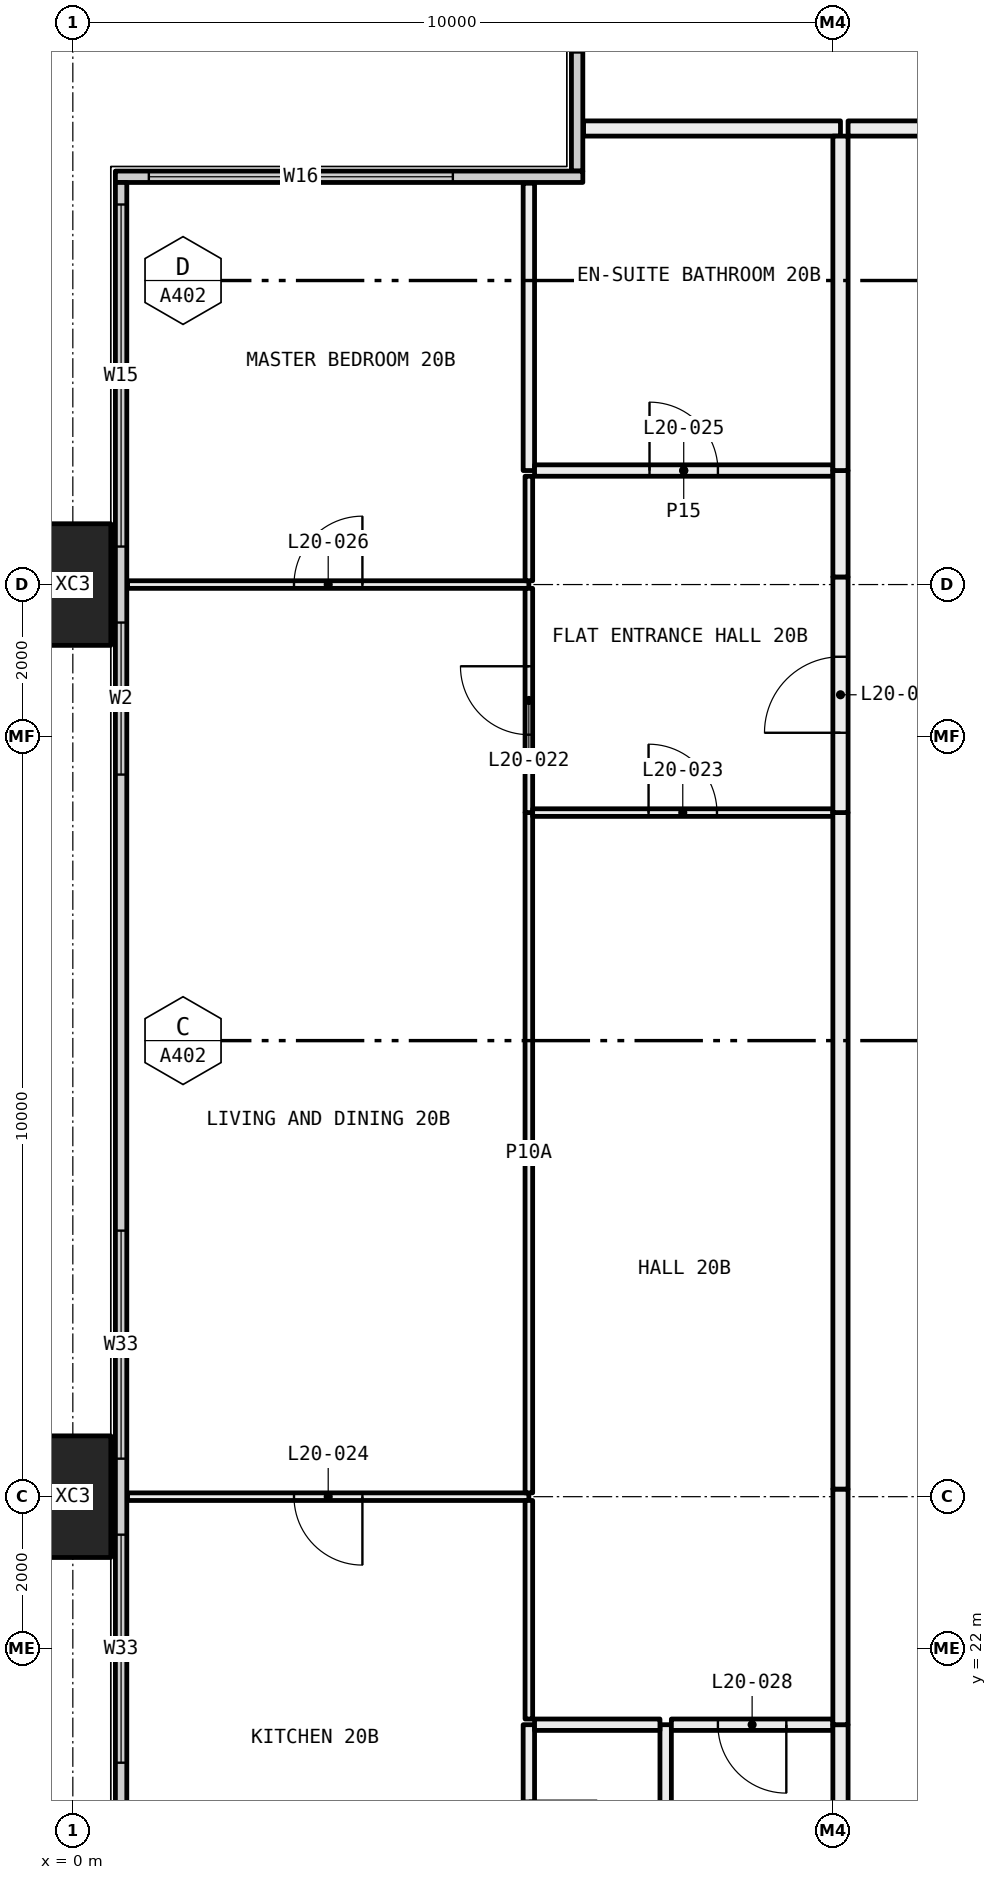
"""IFC4 building model, lengths in metres.
Left out: names, types, materials, properties, quantities, classifications, styles, units other than length and angle.
Written with IfcOpenShell. Run it as: python <this file> out.ifc"""

import sys

from ifc_helpers import new_model, si_unit, direction, frame, frame_2d, origin, origin_2d, place, context, subcontext, project, spatial, rectangle, hollow_rectangle, extrude, element, fill, save


model = new_model("IFC4")
c1 = context("Model", 3, precision=1e-05, world=origin(), true_north=direction((0.0, 1.0)))
c2 = subcontext(c1, "Body", "Model", "MODEL_VIEW")
j1 = project(units=[si_unit("LENGTHUNIT", "METRE"), si_unit("PLANEANGLEUNIT", "RADIAN")], contexts=[c1])
p1 = place(None, origin())
s1 = spatial("IfcSite", under=j1, at=p1, CompositionType="ELEMENT")
p2 = place(p1, origin())
s2 = spatial("IfcBuilding", under=s1, at=p2, CompositionType="ELEMENT")
p3 = place(p2, frame((0.0, 0.0, 81.75)))
s3 = spatial("IfcBuildingStorey", under=s2, at=p3, CompositionType="ELEMENT", Elevation=81.75)
for number, where, z_axis, x_axis in (
    (1, (0.0, 24.0, -0.4), (0.0, 0.0, 1.0), (0.0, 1.0, 0.0)),
    (2, (0.0, 36.0, -0.4), (0.0, 0.0, 1.0), (0.0, 1.0, 0.0)),
):
    element("IfcColumn", number, at=place(p3, frame(where, z_axis=z_axis, x_axis=x_axis)), inside=s3, PredefinedType="COLUMN", context=c2, shape_type="SweptSolid", body=[
        extrude(hollow_rectangle(XDim=1.6, YDim=1.0, WallThickness=0.065, at=origin_2d()), origin(), (0.0, 0.0, 1.0), 3.45),
    ])
p4 = place(p3, frame((6.635, 41.44, 0.0), z_axis=(0.0, 0.0, 1.0), x_axis=(0.0, 1.0, 0.0)))
e3 = element("IfcWall", 3, at=p4, inside=s3, PredefinedType="ELEMENTEDWALL", context=c2, shape_type="SweptSolid", body=[
    extrude(rectangle(XDim=5.85, YDim=0.15, at=frame_2d((2.925, 0.0))), origin(), (0.0, 0.0, 1.0), 3.05),
])
p5 = place(p4, frame((1.56, 0.0, 0.45)))
e4 = element("IfcOpeningElement", 4, at=p5, cuts=e3, PredefinedType="OPENING", context=c2, shape_type="SweptSolid", body=[
    extrude(rectangle(XDim=4.0, YDim=2.55, at=frame_2d((2.0, 1.275))), frame((0.0, 0.085, 0.0), z_axis=(0.0, -1.0, 0.0), x_axis=(1.0, 0.0, 0.0)), (0.0, 0.0, 1.0), 0.17),
])
p6 = place(p3, frame((0.56, 41.365, 0.0), z_axis=(0.0, 0.0, 1.0), x_axis=(1.0, 0.0, 0.0)))
e5 = element("IfcWall", 5, at=p6, inside=s3, PredefinedType="ELEMENTEDWALL", context=c2, shape_type="SweptSolid", body=[
    extrude(rectangle(XDim=6.15, YDim=0.15, at=frame_2d((3.075, 0.0))), origin(), (0.0, 0.0, 1.0), 3.05),
])
p7 = place(p6, frame((0.44, 0.0, 0.45)))
e6 = element("IfcOpeningElement", 6, at=p7, cuts=e5, PredefinedType="OPENING", context=c2, shape_type="SweptSolid", body=[
    extrude(rectangle(XDim=4.0, YDim=2.55, at=frame_2d((2.0, 1.275))), frame((0.0, 0.085, 0.0), z_axis=(0.0, -1.0, 0.0), x_axis=(1.0, 0.0, 0.0)), (0.0, 0.0, 1.0), 0.17),
])
p8 = place(p3, frame((0.635, 6.71, 0.0), z_axis=(0.0, 0.0, 1.0), x_axis=(0.0, 1.0, 0.0)))
e7 = element("IfcWall", 7, at=p8, inside=s3, PredefinedType="ELEMENTEDWALL", context=c2, shape_type="SweptSolid", body=[
    extrude(rectangle(XDim=34.58, YDim=0.15, at=frame_2d((17.29, 0.0))), origin(), (0.0, 0.0, 1.0), 3.05),
])
p9 = place(p8, frame((0.29, 0.0, 0.45)))
e8 = element("IfcOpeningElement", 8, at=p9, cuts=e7, PredefinedType="OPENING", context=c2, shape_type="SweptSolid", body=[
    extrude(rectangle(XDim=4.5, YDim=2.55, at=frame_2d((2.25, 1.275))), frame((0.0, 0.085, 0.0), z_axis=(0.0, -1.0, 0.0), x_axis=(1.0, 0.0, 0.0)), (0.0, 0.0, 1.0), 0.17),
])
p10 = place(p8, frame((5.79, 0.0, 0.45)))
e9 = element("IfcOpeningElement", 9, at=p10, cuts=e7, PredefinedType="OPENING", context=c2, shape_type="SweptSolid", body=[
    extrude(rectangle(XDim=3.0, YDim=2.55, at=frame_2d((1.5, 1.275))), frame((0.0, 0.085, 0.0), z_axis=(0.0, -1.0, 0.0), x_axis=(1.0, 0.0, 0.0)), (0.0, 0.0, 1.0), 0.17),
])
p11 = place(p8, frame((13.79, 0.0, 0.45)))
e10 = element("IfcOpeningElement", 10, at=p11, cuts=e7, PredefinedType="OPENING", context=c2, shape_type="SweptSolid", body=[
    extrude(rectangle(XDim=3.0, YDim=2.55, at=frame_2d((1.5, 1.275))), frame((0.0, 0.085, 0.0), z_axis=(0.0, -1.0, 0.0), x_axis=(1.0, 0.0, 0.0)), (0.0, 0.0, 1.0), 0.17),
])
p12 = place(p8, frame((17.79, 0.0, 0.45)))
e11 = element("IfcOpeningElement", 11, at=p12, cuts=e7, PredefinedType="OPENING", context=c2, shape_type="SweptSolid", body=[
    extrude(rectangle(XDim=3.0, YDim=2.55, at=frame_2d((1.5, 1.275))), frame((0.0, 0.085, 0.0), z_axis=(0.0, -1.0, 0.0), x_axis=(1.0, 0.0, 0.0)), (0.0, 0.0, 1.0), 0.17),
])
p13 = place(p8, frame((26.79, 0.0, 0.45)))
e12 = element("IfcOpeningElement", 12, at=p13, cuts=e7, PredefinedType="OPENING", context=c2, shape_type="SweptSolid", body=[
    extrude(rectangle(XDim=2.0, YDim=2.55, at=frame_2d((1.0, 1.275))), frame((0.0, 0.085, 0.0), z_axis=(0.0, -1.0, 0.0), x_axis=(1.0, 0.0, 0.0)), (0.0, 0.0, 1.0), 0.17),
])
p14 = place(p8, frame((29.79, 0.0, 0.45)))
e13 = element("IfcOpeningElement", 13, at=p14, cuts=e7, PredefinedType="OPENING", context=c2, shape_type="SweptSolid", body=[
    extrude(rectangle(XDim=4.5, YDim=2.55, at=frame_2d((2.25, 1.275))), frame((0.0, 0.085, 0.0), z_axis=(0.0, -1.0, 0.0), x_axis=(1.0, 0.0, 0.0)), (0.0, 0.0, 1.0), 0.17),
])
p15 = place(p3, frame((6.0, 24.0, 0.0), z_axis=(0.0, 0.0, 1.0), x_axis=(-1.0, 0.0, 0.0)))
e14 = element("IfcWall", 14, at=p15, inside=s3, PredefinedType="PARTITIONING", context=c2, shape_type="SweptSolid", body=[
    extrude(rectangle(XDim=5.28, YDim=0.1, at=frame_2d((2.64, 0.0))), origin(), (0.0, 0.0, 1.0), 2.45),
])
p16 = place(p15, frame((2.19, 0.0, 0.0)))
e15 = element("IfcOpeningElement", 15, at=p16, cuts=e14, PredefinedType="OPENING", context=c2, shape_type="SweptSolid", body=[
    extrude(rectangle(XDim=0.9, YDim=2.1, at=frame_2d((0.45, 1.05))), frame((0.0, 0.06, 0.0), z_axis=(0.0, -1.0, 0.0), x_axis=(1.0, 0.0, 0.0)), (0.0, 0.0, 1.0), 0.12),
])
p17 = place(p3, frame((6.0, 18.1, 0.0), z_axis=(0.0, 0.0, 1.0), x_axis=(0.0, 1.0, 0.0)))
e16 = element("IfcWall", 16, at=p17, inside=s3, PredefinedType="PARTITIONING", context=c2, shape_type="SweptSolid", body=[
    extrude(rectangle(XDim=2.9, YDim=0.15, at=frame_2d((1.45, 0.0))), origin(), (0.0, 0.0, 1.0), 3.05),
])
p18 = place(p17, frame((1.0, 0.0, 0.0)))
e17 = element("IfcOpeningElement", 17, at=p18, cuts=e16, PredefinedType="OPENING", context=c2, shape_type="SweptSolid", body=[
    extrude(rectangle(XDim=0.9, YDim=2.1, at=frame_2d((0.45, 1.05))), frame((0.0, 0.085, 0.0), z_axis=(0.0, -1.0, 0.0), x_axis=(1.0, 0.0, 0.0)), (0.0, 0.0, 1.0), 0.17),
])
p19 = place(p3, frame((6.0, 21.075, 0.0), z_axis=(0.0, 0.0, 1.0), x_axis=(0.0, 1.0, 0.0)))
e18 = element("IfcWall", 18, at=p19, inside=s3, PredefinedType="PARTITIONING", context=c2, shape_type="SweptSolid", body=[
    extrude(rectangle(XDim=2.875, YDim=0.1, at=frame_2d((1.438, 0.0))), origin(), (0.0, 0.0, 1.0), 2.45),
])
p20 = place(p3, frame((6.0, 36.0, 0.0), z_axis=(0.0, 0.0, 1.0), x_axis=(-1.0, 0.0, 0.0)))
e19 = element("IfcWall", 19, at=p20, inside=s3, PredefinedType="PARTITIONING", context=c2, shape_type="SweptSolid", body=[
    extrude(rectangle(XDim=5.28, YDim=0.1, at=frame_2d((2.64, 0.0))), origin(), (0.0, 0.0, 1.0), 2.45),
])
p21 = place(p20, frame((2.19, 0.0, 0.0)))
e20 = element("IfcOpeningElement", 20, at=p21, cuts=e19, PredefinedType="OPENING", context=c2, shape_type="SweptSolid", body=[
    extrude(rectangle(XDim=0.9, YDim=2.1, at=frame_2d((0.45, 1.05))), frame((0.0, 0.06, 0.0), z_axis=(0.0, -1.0, 0.0), x_axis=(1.0, 0.0, 0.0)), (0.0, 0.0, 1.0), 0.12),
])
p22 = place(p3, frame((6.0, 24.05, 0.0), z_axis=(0.0, 0.0, 1.0), x_axis=(0.0, 1.0, 0.0)))
e21 = element("IfcWall", 21, at=p22, inside=s3, PredefinedType="PARTITIONING", context=c2, shape_type="SweptSolid", body=[
    extrude(rectangle(XDim=8.95, YDim=0.1, at=frame_2d((4.475, 0.0))), origin(), (0.0, 0.0, 1.0), 2.45),
])
p23 = place(p3, frame((6.0, 33.0, 0.0), z_axis=(0.0, 0.0, 1.0), x_axis=(0.0, 1.0, 0.0)))
e22 = element("IfcWall", 22, at=p23, inside=s3, PredefinedType="PARTITIONING", context=c2, shape_type="SweptSolid", body=[
    extrude(rectangle(XDim=2.95, YDim=0.1, at=frame_2d((1.475, 0.0))), origin(), (0.0, 0.0, 1.0), 2.45),
])
p24 = place(p23, frame((1.025, 0.0, 0.0)))
e23 = element("IfcOpeningElement", 23, at=p24, cuts=e22, PredefinedType="OPENING", context=c2, shape_type="SweptSolid", body=[
    extrude(rectangle(XDim=0.9, YDim=2.1, at=frame_2d((0.45, 1.05))), frame((0.0, 0.06, 0.0), z_axis=(0.0, -1.0, 0.0), x_axis=(1.0, 0.0, 0.0)), (0.0, 0.0, 1.0), 0.12),
])
p25 = place(p3, frame((6.0, 36.05, 0.0), z_axis=(0.0, 0.0, 1.0), x_axis=(0.0, 1.0, 0.0)))
e24 = element("IfcWall", 24, at=p25, inside=s3, PredefinedType="PARTITIONING", context=c2, shape_type="SweptSolid", body=[
    extrude(rectangle(XDim=1.375, YDim=0.1, at=frame_2d((0.688, 0.0))), origin(), (0.0, 0.0, 1.0), 2.45),
])
p26 = place(p3, frame((6.0, 37.5, 0.0), z_axis=(0.0, 0.0, 1.0), x_axis=(0.0, 1.0, 0.0)))
e25 = element("IfcWall", 25, at=p26, inside=s3, PredefinedType="PARTITIONING", context=c2, shape_type="SweptSolid", body=[
    extrude(rectangle(XDim=3.78, YDim=0.15, at=frame_2d((1.89, 0.0))), origin(), (0.0, 0.0, 1.0), 3.05),
])
p27 = place(p3, frame((7.8, 18.1, 0.0), z_axis=(0.0, 0.0, 1.0), x_axis=(0.0, 1.0, 0.0)))
e26 = element("IfcWall", 26, at=p27, inside=s3, PredefinedType="PARTITIONING", context=c2, shape_type="SweptSolid", body=[
    extrude(rectangle(XDim=2.9, YDim=0.15, at=frame_2d((1.45, 0.0))), origin(), (0.0, 0.0, 1.0), 3.05),
])
p28 = place(p3, frame((7.725, 21.0, 0.0), z_axis=(0.0, 0.0, 1.0), x_axis=(-1.0, 0.0, 0.0)))
e27 = element("IfcWall", 27, at=p28, inside=s3, PredefinedType="PARTITIONING", context=c2, shape_type="SweptSolid", body=[
    extrude(rectangle(XDim=1.65, YDim=0.15, at=frame_2d((0.825, 0.0))), origin(), (0.0, 0.0, 1.0), 3.05),
])
p29 = place(p3, frame((10.0, 21.0, 0.0), z_axis=(0.0, 0.0, 1.0), x_axis=(-1.0, 0.0, 0.0)))
e28 = element("IfcWall", 28, at=p29, inside=s3, PredefinedType="PARTITIONING", context=c2, shape_type="SweptSolid", body=[
    extrude(rectangle(XDim=2.125, YDim=0.15, at=frame_2d((1.062, 0.0))), origin(), (0.0, 0.0, 1.0), 3.05),
])
p30 = place(p29, frame((0.613, 0.0, 0.0)))
e29 = element("IfcOpeningElement", 29, at=p30, cuts=e28, PredefinedType="OPENING", context=c2, shape_type="SweptSolid", body=[
    extrude(rectangle(XDim=0.9, YDim=2.1, at=frame_2d((0.45, 1.05))), frame((0.0, 0.085, 0.0), z_axis=(0.0, -1.0, 0.0), x_axis=(1.0, 0.0, 0.0)), (0.0, 0.0, 1.0), 0.17),
])
p31 = place(p3, frame((10.1, 18.1, 0.0), z_axis=(0.0, 0.0, 1.0), x_axis=(0.0, 1.0, 0.0)))
e30 = element("IfcWall", 30, at=p31, inside=s3, PredefinedType="PARTITIONING", context=c2, shape_type="SweptSolid", body=[
    extrude(rectangle(XDim=2.9, YDim=0.2, at=frame_2d((1.45, 0.0))), origin(), (0.0, 0.0, 1.0), 3.05),
])
p32 = place(p3, frame((10.0, 33.0, 0.0), z_axis=(0.0, 0.0, 1.0), x_axis=(-1.0, 0.0, 0.0)))
e31 = element("IfcWall", 31, at=p32, inside=s3, PredefinedType="PARTITIONING", context=c2, shape_type="SweptSolid", body=[
    extrude(rectangle(XDim=3.95, YDim=0.1, at=frame_2d((1.975, 0.0))), origin(), (0.0, 0.0, 1.0), 3.05),
])
p33 = place(p32, frame((1.525, 0.0, 0.0)))
e32 = element("IfcOpeningElement", 32, at=p33, cuts=e31, PredefinedType="OPENING", context=c2, shape_type="SweptSolid", body=[
    extrude(rectangle(XDim=0.9, YDim=2.1, at=frame_2d((0.45, 1.05))), frame((0.0, 0.06, 0.0), z_axis=(0.0, -1.0, 0.0), x_axis=(1.0, 0.0, 0.0)), (0.0, 0.0, 1.0), 0.12),
])
p34 = place(p3, frame((10.1, 21.0, 0.0), z_axis=(0.0, 0.0, 1.0), x_axis=(0.0, 1.0, 0.0)))
e33 = element("IfcWall", 33, at=p34, inside=s3, PredefinedType="PARTITIONING", context=c2, shape_type="SweptSolid", body=[
    extrude(rectangle(XDim=3.1, YDim=0.2, at=frame_2d((1.55, 0.0))), origin(), (0.0, 0.0, 1.0), 2.45),
])
p35 = place(p3, frame((10.1, 24.1, 0.0), z_axis=(0.0, 0.0, 1.0), x_axis=(0.0, 1.0, 0.0)))
e34 = element("IfcWall", 34, at=p35, inside=s3, PredefinedType="PARTITIONING", context=c2, shape_type="SweptSolid", body=[
    extrude(rectangle(XDim=8.9, YDim=0.2, at=frame_2d((4.45, 0.0))), origin(), (0.0, 0.0, 1.0), 3.05),
])
p36 = place(p3, frame((10.0, 37.5, 0.0), z_axis=(0.0, 0.0, 1.0), x_axis=(-1.0, 0.0, 0.0)))
e35 = element("IfcWall", 35, at=p36, inside=s3, PredefinedType="PARTITIONING", context=c2, shape_type="SweptSolid", body=[
    extrude(rectangle(XDim=3.925, YDim=0.15, at=frame_2d((1.962, 0.0))), origin(), (0.0, 0.0, 1.0), 3.05),
])
p37 = place(p36, frame((1.512, 0.0, 0.0)))
e36 = element("IfcOpeningElement", 36, at=p37, cuts=e35, PredefinedType="OPENING", context=c2, shape_type="SweptSolid", body=[
    extrude(rectangle(XDim=0.9, YDim=2.1, at=frame_2d((0.45, 1.05))), frame((0.0, 0.085, 0.0), z_axis=(0.0, -1.0, 0.0), x_axis=(1.0, 0.0, 0.0)), (0.0, 0.0, 1.0), 0.17),
])
p38 = place(p3, frame((10.1, 33.0, 0.0), z_axis=(0.0, 0.0, 1.0), x_axis=(0.0, 1.0, 0.0)))
e37 = element("IfcWall", 37, at=p38, inside=s3, PredefinedType="PARTITIONING", context=c2, shape_type="SweptSolid", body=[
    extrude(rectangle(XDim=3.1, YDim=0.2, at=frame_2d((1.55, 0.0))), origin(), (0.0, 0.0, 1.0), 2.45),
])
p39 = place(p38, frame((1.05, 0.0, 0.0)))
e38 = element("IfcOpeningElement", 38, at=p39, cuts=e37, PredefinedType="OPENING", context=c2, shape_type="SweptSolid", body=[
    extrude(rectangle(XDim=1.0, YDim=2.1, at=frame_2d((0.5, 1.05))), frame((0.0, 0.11, 0.0), z_axis=(0.0, -1.0, 0.0), x_axis=(1.0, 0.0, 0.0)), (0.0, 0.0, 1.0), 0.22),
])
p40 = place(p3, frame((10.1, 36.1, 0.0), z_axis=(0.0, 0.0, 1.0), x_axis=(0.0, 1.0, 0.0)))
e39 = element("IfcWall", 39, at=p40, inside=s3, PredefinedType="PARTITIONING", context=c2, shape_type="SweptSolid", body=[
    extrude(rectangle(XDim=1.4, YDim=0.2, at=frame_2d((0.7, 0.0))), origin(), (0.0, 0.0, 1.0), 3.05),
])
p41 = place(p3, frame((10.1, 42.0, 0.0), z_axis=(0.0, 0.0, 1.0), x_axis=(-1.0, 0.0, 0.0)))
e40 = element("IfcWall", 40, at=p41, inside=s3, PredefinedType="PARTITIONING", context=c2, shape_type="SweptSolid", body=[
    extrude(rectangle(XDim=3.38, YDim=0.2, at=frame_2d((1.69, 0.0))), origin(), (0.0, 0.0, 1.0), 3.05),
])
p42 = place(p3, frame((10.1, 37.5, 0.0), z_axis=(0.0, 0.0, 1.0), x_axis=(0.0, 1.0, 0.0)))
e41 = element("IfcWall", 41, at=p42, inside=s3, PredefinedType="PARTITIONING", context=c2, shape_type="SweptSolid", body=[
    extrude(rectangle(XDim=4.4, YDim=0.2, at=frame_2d((2.2, 0.0))), origin(), (0.0, 0.0, 1.0), 3.05),
])
p43 = place(p3, frame((10.2, 42.0, 0.0), z_axis=(0.0, 0.0, 1.0), x_axis=(1.0, 0.0, 0.0)))
e42 = element("IfcWall", 42, at=p43, inside=s3, PredefinedType="PARTITIONING", context=c2, shape_type="SweptSolid", body=[
    extrude(rectangle(XDim=1.8, YDim=0.2, at=frame_2d((0.9, 0.0))), origin(), (0.0, 0.0, 1.0), 3.05),
])
p44 = place(p7, origin())
e43 = element("IfcWindow", 43, at=p44, inside=s3, PartitioningType="SINGLE_PANEL", PredefinedType="WINDOW", context=c2, shape_type="SweptSolid", body=[
    extrude(rectangle(XDim=4.0, YDim=2.55, at=frame_2d((2.0, 1.275))), frame((0.0, 0.03, 0.0), z_axis=(0.0, -1.0, 0.0), x_axis=(1.0, 0.0, 0.0)), (0.0, 0.0, 1.0), 0.06),
])
fill(e6, e43)
p45 = place(p11, origin())
e44 = element("IfcWindow", 44, at=p45, inside=s3, PartitioningType="SINGLE_PANEL", PredefinedType="WINDOW", context=c2, shape_type="SweptSolid", body=[
    extrude(rectangle(XDim=3.0, YDim=2.55, at=frame_2d((1.5, 1.275))), frame((0.0, 0.03, 0.0), z_axis=(0.0, -1.0, 0.0), x_axis=(1.0, 0.0, 0.0)), (0.0, 0.0, 1.0), 0.06),
])
fill(e10, e44)
p46 = place(p12, origin())
e45 = element("IfcWindow", 45, at=p46, inside=s3, PartitioningType="SINGLE_PANEL", PredefinedType="WINDOW", context=c2, shape_type="SweptSolid", body=[
    extrude(rectangle(XDim=3.0, YDim=2.55, at=frame_2d((1.5, 1.275))), frame((0.0, 0.03, 0.0), z_axis=(0.0, -1.0, 0.0), x_axis=(1.0, 0.0, 0.0)), (0.0, 0.0, 1.0), 0.06),
])
fill(e11, e45)
p47 = place(p13, origin())
e46 = element("IfcWindow", 46, at=p47, inside=s3, PartitioningType="SINGLE_PANEL", PredefinedType="WINDOW", context=c2, shape_type="SweptSolid", body=[
    extrude(rectangle(XDim=2.0, YDim=2.55, at=frame_2d((1.0, 1.275))), frame((0.0, 0.03, 0.0), z_axis=(0.0, -1.0, 0.0), x_axis=(1.0, 0.0, 0.0)), (0.0, 0.0, 1.0), 0.06),
])
fill(e12, e46)
p48 = place(p14, origin())
e47 = element("IfcWindow", 47, at=p48, inside=s3, PartitioningType="SINGLE_PANEL", PredefinedType="WINDOW", context=c2, shape_type="SweptSolid", body=[
    extrude(rectangle(XDim=4.5, YDim=2.55, at=frame_2d((2.25, 1.275))), frame((0.0, 0.03, 0.0), z_axis=(0.0, -1.0, 0.0), x_axis=(1.0, 0.0, 0.0)), (0.0, 0.0, 1.0), 0.06),
])
fill(e13, e47)
p49 = place(p39, origin())
e48 = element("IfcDoor", 48, at=p49, inside=s3, OperationType="SINGLE_SWING_RIGHT", PredefinedType="DOOR", context=c2, shape_type="SweptSolid", body=[
    extrude(rectangle(XDim=1.0, YDim=2.1, at=frame_2d((0.5, 1.05))), frame((0.0, 0.025, 0.0), z_axis=(0.0, -1.0, 0.0), x_axis=(1.0, 0.0, 0.0)), (0.0, 0.0, 1.0), 0.05),
])
fill(e38, e48)
p50 = place(p24, origin())
e49 = element("IfcDoor", 49, at=p50, inside=s3, OperationType="SINGLE_SWING_LEFT", PredefinedType="DOOR", context=c2, shape_type="SweptSolid", body=[
    extrude(rectangle(XDim=0.9, YDim=2.1, at=frame_2d((0.45, 1.05))), frame((0.0, 0.025, 0.0), z_axis=(0.0, -1.0, 0.0), x_axis=(1.0, 0.0, 0.0)), (0.0, 0.0, 1.0), 0.05),
])
fill(e23, e49)
p51 = place(p33, frame((0.9, 0.0, 0.0), x_axis=(-1.0, 0.0, 0.0)))
e50 = element("IfcDoor", 50, at=p51, inside=s3, OperationType="SINGLE_SWING_RIGHT", PredefinedType="DOOR", context=c2, shape_type="SweptSolid", body=[
    extrude(rectangle(XDim=0.9, YDim=2.1, at=frame_2d((0.45, 1.05))), frame((0.0, 0.025, 0.0), z_axis=(0.0, -1.0, 0.0), x_axis=(1.0, 0.0, 0.0)), (0.0, 0.0, 1.0), 0.05),
])
fill(e32, e50)
p52 = place(p16, origin())
e51 = element("IfcDoor", 51, at=p52, inside=s3, OperationType="SINGLE_SWING_RIGHT", PredefinedType="DOOR", context=c2, shape_type="SweptSolid", body=[
    extrude(rectangle(XDim=0.9, YDim=2.1, at=frame_2d((0.45, 1.05))), frame((0.0, 0.025, 0.0), z_axis=(0.0, -1.0, 0.0), x_axis=(1.0, 0.0, 0.0)), (0.0, 0.0, 1.0), 0.05),
])
fill(e15, e51)
p53 = place(p37, frame((0.9, 0.0, 0.0), x_axis=(-1.0, 0.0, 0.0)))
e52 = element("IfcDoor", 52, at=p53, inside=s3, OperationType="SINGLE_SWING_RIGHT", PredefinedType="DOOR", context=c2, shape_type="SweptSolid", body=[
    extrude(rectangle(XDim=0.9, YDim=2.1, at=frame_2d((0.45, 1.05))), frame((0.0, 0.025, 0.0), z_axis=(0.0, -1.0, 0.0), x_axis=(1.0, 0.0, 0.0)), (0.0, 0.0, 1.0), 0.05),
])
fill(e36, e52)
p54 = place(p21, frame((0.9, 0.0, 0.0), x_axis=(-1.0, 0.0, 0.0)))
e53 = element("IfcDoor", 53, at=p54, inside=s3, OperationType="SINGLE_SWING_LEFT", PredefinedType="DOOR", context=c2, shape_type="SweptSolid", body=[
    extrude(rectangle(XDim=0.9, YDim=2.1, at=frame_2d((0.45, 1.05))), frame((0.0, 0.025, 0.0), z_axis=(0.0, -1.0, 0.0), x_axis=(1.0, 0.0, 0.0)), (0.0, 0.0, 1.0), 0.05),
])
fill(e20, e53)
p55 = place(p30, origin())
e54 = element("IfcDoor", 54, at=p55, inside=s3, OperationType="SINGLE_SWING_RIGHT", PredefinedType="DOOR", context=c2, shape_type="SweptSolid", body=[
    extrude(rectangle(XDim=0.9, YDim=2.1, at=frame_2d((0.45, 1.05))), frame((0.0, 0.025, 0.0), z_axis=(0.0, -1.0, 0.0), x_axis=(1.0, 0.0, 0.0)), (0.0, 0.0, 1.0), 0.05),
])
fill(e29, e54)
save(model, sys.argv[1])
